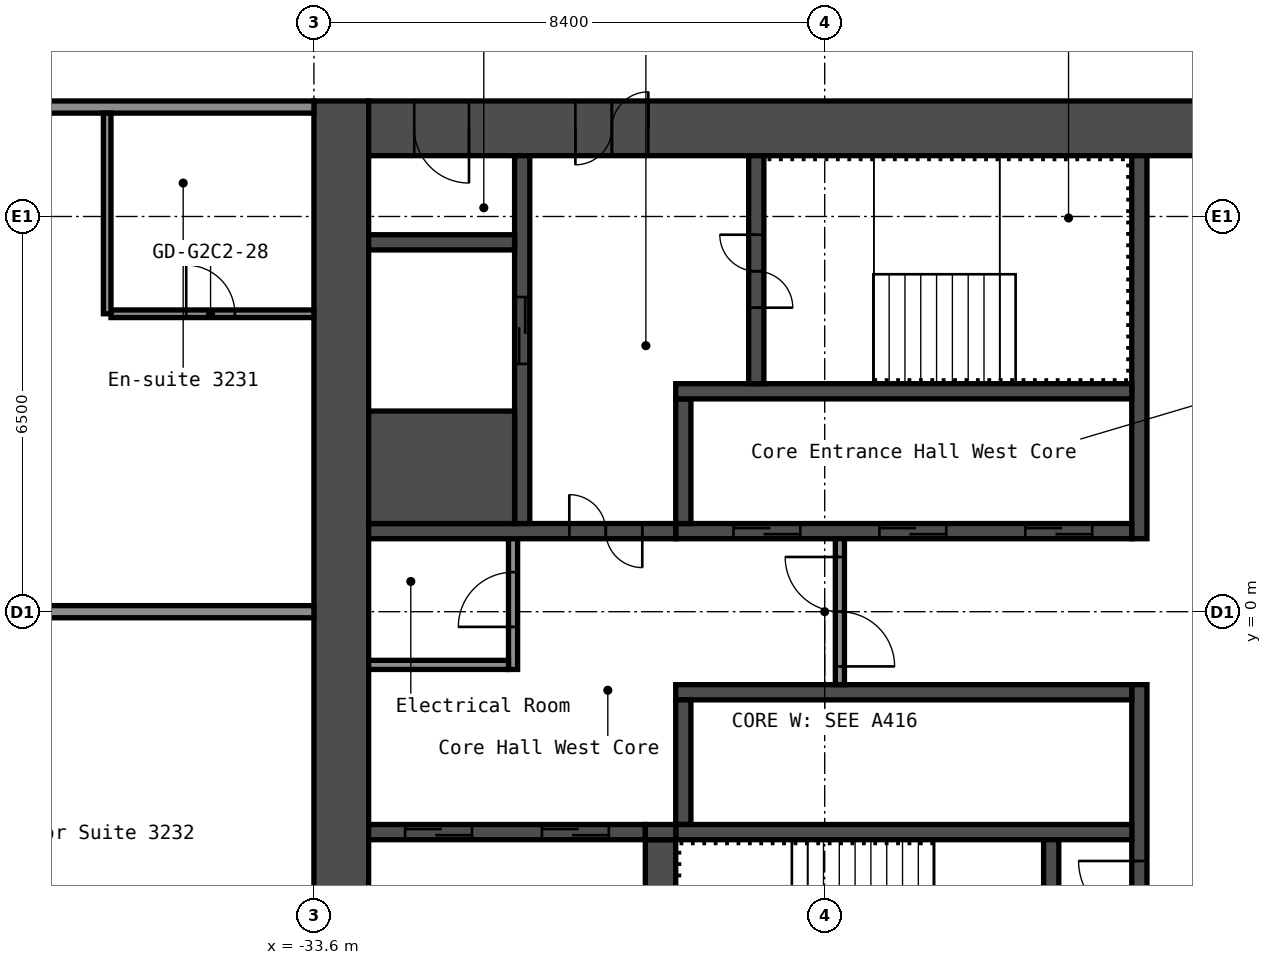
"""IFC4 building model, lengths in metres.
Left out: names, types, materials, properties, quantities, classifications, styles, units other than length and angle.
Written with IfcOpenShell. Run it as: python <this file> out.ifc"""

import sys

from ifc_helpers import new_model, si_unit, direction, frame, frame_2d, origin, place, context, subcontext, project, spatial, rectangle, extrude, element, fill, save


model = new_model("IFC4")
c1 = context("Model", 3, precision=1e-05, world=origin(), true_north=direction((0.0, 1.0)))
c2 = subcontext(c1, "Body", "Model", "MODEL_VIEW")
j1 = project(units=[si_unit("LENGTHUNIT", "METRE"), si_unit("PLANEANGLEUNIT", "RADIAN")], contexts=[c1])
p1 = place(None, origin())
s1 = spatial("IfcSite", under=j1, at=p1, CompositionType="ELEMENT")
p2 = place(p1, origin())
s2 = spatial("IfcBuilding", under=s1, at=p2, CompositionType="ELEMENT")
p3 = place(p2, frame((0.0, 0.0, 113.8)))
s3 = spatial("IfcBuildingStorey", under=s2, at=p3, CompositionType="ELEMENT", Elevation=113.8)
p4 = place(p3, frame((-33.15, -8.4, 0.0), z_axis=(0.0, 0.0, 1.0), x_axis=(0.0, 1.0, 0.0)))
e1 = element("IfcWall", 1, at=p4, inside=s3, PredefinedType="SHEAR", context=c2, shape_type="SweptSolid", body=[
    extrude(rectangle(XDim=16.8, YDim=0.9, at=frame_2d((8.4, 0.0))), origin(), (0.0, 0.0, 1.0), 2.8),
])
p5 = place(p3, frame((-32.7, 7.95, 0.0), z_axis=(0.0, 0.0, 1.0), x_axis=(1.0, 0.0, 0.0)))
e2 = element("IfcWall", 2, at=p5, inside=s3, PredefinedType="SHEAR", context=c2, shape_type="SweptSolid", body=[
    extrude(rectangle(XDim=15.0, YDim=0.9, at=frame_2d((7.5, 0.0))), origin(), (0.0, 0.0, 1.0), 2.8),
])
p6 = place(p5, frame((3.4, 0.0, 0.0)))
e3 = element("IfcOpeningElement", 3, at=p6, cuts=e2, PredefinedType="OPENING", context=c2, shape_type="SweptSolid", body=[
    extrude(rectangle(XDim=1.2, YDim=2.1, at=frame_2d((0.6, 1.05))), frame((0.0, 0.46, 0.0), z_axis=(0.0, -1.0, 0.0), x_axis=(1.0, 0.0, 0.0)), (0.0, 0.0, 1.0), 0.92),
])
p7 = place(p5, frame((0.75, 0.0, 0.0)))
e4 = element("IfcOpeningElement", 4, at=p7, cuts=e2, PredefinedType="OPENING", context=c2, shape_type="SweptSolid", body=[
    extrude(rectangle(XDim=0.9, YDim=2.1, at=frame_2d((0.45, 1.05))), frame((0.0, 0.46, 0.0), z_axis=(0.0, -1.0, 0.0), x_axis=(1.0, 0.0, 0.0)), (0.0, 0.0, 1.0), 0.92),
])
p8 = place(p3, frame((-20.025, 1.2, 0.0), z_axis=(0.0, 0.0, 1.0), x_axis=(0.0, 1.0, 0.0)))
e5 = element("IfcWall", 5, at=p8, inside=s3, PredefinedType="SHEAR", context=c2, shape_type="SweptSolid", body=[
    extrude(rectangle(XDim=6.3, YDim=0.25, at=frame_2d((3.15, 0.0))), origin(), (0.0, 0.0, 1.0), 2.8),
])
p9 = place(p3, frame((-20.025, -7.5, 0.0), z_axis=(0.0, 0.0, 1.0), x_axis=(0.0, 1.0, 0.0)))
e6 = element("IfcWall", 6, at=p9, inside=s3, PredefinedType="SHEAR", context=c2, shape_type="SweptSolid", body=[
    extrude(rectangle(XDim=6.3, YDim=0.25, at=frame_2d((3.15, 0.0))), origin(), (0.0, 0.0, 1.0), 2.8),
])
p10 = place(p9, frame((2.4, 0.0, 0.0)))
e7 = element("IfcOpeningElement", 7, at=p10, cuts=e6, PredefinedType="OPENING", context=c2, shape_type="SweptSolid", body=[
    extrude(rectangle(XDim=1.0, YDim=2.1, at=frame_2d((0.5, 1.05))), frame((0.0, 0.135, 0.0), z_axis=(0.0, -1.0, 0.0), x_axis=(1.0, 0.0, 0.0)), (0.0, 0.0, 1.0), 0.27),
])
p11 = place(p3, frame((-27.65, 1.325, 0.0), z_axis=(0.0, 0.0, 1.0), x_axis=(1.0, 0.0, 0.0)))
e8 = element("IfcWall", 8, at=p11, inside=s3, PredefinedType="SHEAR", context=c2, shape_type="SweptSolid", body=[
    extrude(rectangle(XDim=7.5, YDim=0.25, at=frame_2d((3.75, 0.0))), origin(), (0.0, 0.0, 1.0), 2.8),
])
p12 = place(p11, frame((5.75, 0.0, 0.0)))
e9 = element("IfcOpeningElement", 9, at=p12, cuts=e8, PredefinedType="OPENING", context=c2, shape_type="SweptSolid", body=[
    extrude(rectangle(XDim=1.1, YDim=2.1, at=frame_2d((0.55, 1.05))), frame((0.0, 0.135, 0.0), z_axis=(0.0, -1.0, 0.0), x_axis=(1.0, 0.0, 0.0)), (0.0, 0.0, 1.0), 0.27),
])
p13 = place(p11, frame((3.35, 0.0, 0.0)))
e10 = element("IfcOpeningElement", 10, at=p13, cuts=e8, PredefinedType="OPENING", context=c2, shape_type="SweptSolid", body=[
    extrude(rectangle(XDim=1.1, YDim=2.1, at=frame_2d((0.55, 1.05))), frame((0.0, 0.135, 0.0), z_axis=(0.0, -1.0, 0.0), x_axis=(1.0, 0.0, 0.0)), (0.0, 0.0, 1.0), 0.27),
])
p14 = place(p11, frame((0.95, 0.0, 0.0)))
e11 = element("IfcOpeningElement", 11, at=p14, cuts=e8, PredefinedType="OPENING", context=c2, shape_type="SweptSolid", body=[
    extrude(rectangle(XDim=1.1, YDim=2.1, at=frame_2d((0.55, 1.05))), frame((0.0, 0.135, 0.0), z_axis=(0.0, -1.0, 0.0), x_axis=(1.0, 0.0, 0.0)), (0.0, 0.0, 1.0), 0.27),
])
p15 = place(p3, frame((-27.525, 1.45, 0.0), z_axis=(0.0, 0.0, 1.0), x_axis=(0.0, 1.0, 0.0)))
e12 = element("IfcWall", 12, at=p15, inside=s3, PredefinedType="SHEAR", context=c2, shape_type="SweptSolid", body=[
    extrude(rectangle(XDim=2.05, YDim=0.25, at=frame_2d((1.025, 0.0))), origin(), (0.0, 0.0, 1.0), 2.8),
])
p16 = place(p3, frame((-27.65, 3.625, 0.0), z_axis=(0.0, 0.0, 1.0), x_axis=(1.0, 0.0, 0.0)))
e13 = element("IfcWall", 13, at=p16, inside=s3, PredefinedType="SHEAR", context=c2, shape_type="SweptSolid", body=[
    extrude(rectangle(XDim=7.5, YDim=0.25, at=frame_2d((3.75, 0.0))), origin(), (0.0, 0.0, 1.0), 2.8),
])
p17 = place(p3, frame((-26.325, 3.75, 0.0), z_axis=(0.0, 0.0, 1.0), x_axis=(0.0, 1.0, 0.0)))
e14 = element("IfcWall", 14, at=p17, inside=s3, PredefinedType="SHEAR", context=c2, shape_type="SweptSolid", body=[
    extrude(rectangle(XDim=3.75, YDim=0.25, at=frame_2d((1.875, 0.0))), origin(), (0.0, 0.0, 1.0), 2.8),
])
p18 = place(p17, frame((1.25, 0.0, 0.0)))
e15 = element("IfcOpeningElement", 15, at=p18, cuts=e14, PredefinedType="OPENING", context=c2, shape_type="SweptSolid", body=[
    extrude(rectangle(XDim=1.2, YDim=2.1, at=frame_2d((0.6, 1.05))), frame((0.0, 0.135, 0.0), z_axis=(0.0, -1.0, 0.0), x_axis=(1.0, 0.0, 0.0)), (0.0, 0.0, 1.0), 0.27),
])
p19 = place(p3, frame((-32.7, 1.325, 0.0), z_axis=(0.0, 0.0, 1.0), x_axis=(1.0, 0.0, 0.0)))
e16 = element("IfcWall", 16, at=p19, inside=s3, PredefinedType="SHEAR", context=c2, shape_type="SweptSolid", body=[
    extrude(rectangle(XDim=5.05, YDim=0.25, at=frame_2d((2.525, 0.0))), origin(), (0.0, 0.0, 1.0), 2.8),
])
p20 = place(p19, frame((3.3, 0.0, 0.0)))
e17 = element("IfcOpeningElement", 17, at=p20, cuts=e16, PredefinedType="OPENING", context=c2, shape_type="SweptSolid", body=[
    extrude(rectangle(XDim=1.2, YDim=2.1, at=frame_2d((0.6, 1.05))), frame((0.0, 0.135, 0.0), z_axis=(0.0, -1.0, 0.0), x_axis=(1.0, 0.0, 0.0)), (0.0, 0.0, 1.0), 0.27),
])
p21 = place(p3, frame((-30.175, 1.45, 0.0), z_axis=(0.0, 0.0, 1.0), x_axis=(0.0, 1.0, 0.0)))
e18 = element("IfcWall", 18, at=p21, inside=s3, PredefinedType="SHEAR", context=c2, shape_type="SweptSolid", body=[
    extrude(rectangle(XDim=6.05, YDim=0.25, at=frame_2d((3.025, 0.0))), origin(), (0.0, 0.0, 1.0), 2.8),
])
p22 = place(p21, frame((2.625, 0.0, 0.0)))
e19 = element("IfcOpeningElement", 19, at=p22, cuts=e18, PredefinedType="OPENING", context=c2, shape_type="SweptSolid", body=[
    extrude(rectangle(XDim=1.1, YDim=2.1, at=frame_2d((0.55, 1.05))), frame((0.0, 0.135, 0.0), z_axis=(0.0, -1.0, 0.0), x_axis=(1.0, 0.0, 0.0)), (0.0, 0.0, 1.0), 0.27),
])
p23 = place(p3, frame((-32.7, 2.375, 0.0), z_axis=(0.0, 0.0, 1.0), x_axis=(1.0, 0.0, 0.0)))
e20 = element("IfcWall", 20, at=p23, inside=s3, PredefinedType="SHEAR", context=c2, shape_type="SweptSolid", body=[
    extrude(rectangle(XDim=2.4, YDim=1.85, at=frame_2d((1.2, 0.0))), origin(), (0.0, 0.0, 1.0), 2.8),
])
p24 = place(p3, frame((-32.7, 6.075, 0.0), z_axis=(0.0, 0.0, 1.0), x_axis=(1.0, 0.0, 0.0)))
e21 = element("IfcWall", 21, at=p24, inside=s3, PredefinedType="SHEAR", context=c2, shape_type="SweptSolid", body=[
    extrude(rectangle(XDim=2.4, YDim=0.25, at=frame_2d((1.2, 0.0))), origin(), (0.0, 0.0, 1.0), 2.8),
])
p25 = place(p3, frame((-27.65, -1.325, 0.0), z_axis=(0.0, 0.0, 1.0), x_axis=(1.0, 0.0, 0.0)))
e22 = element("IfcWall", 22, at=p25, inside=s3, PredefinedType="SHEAR", context=c2, shape_type="SweptSolid", body=[
    extrude(rectangle(XDim=7.5, YDim=0.25, at=frame_2d((3.75, 0.0))), origin(), (0.0, 0.0, 1.0), 2.8),
])
p26 = place(p3, frame((-27.525, -3.5, 0.0), z_axis=(0.0, 0.0, 1.0), x_axis=(0.0, 1.0, 0.0)))
e23 = element("IfcWall", 23, at=p26, inside=s3, PredefinedType="SHEAR", context=c2, shape_type="SweptSolid", body=[
    extrude(rectangle(XDim=2.05, YDim=0.25, at=frame_2d((1.025, 0.0))), origin(), (0.0, 0.0, 1.0), 2.8),
])
p27 = place(p3, frame((-27.65, -3.625, 0.0), z_axis=(0.0, 0.0, 1.0), x_axis=(1.0, 0.0, 0.0)))
e24 = element("IfcWall", 24, at=p27, inside=s3, PredefinedType="SHEAR", context=c2, shape_type="SweptSolid", body=[
    extrude(rectangle(XDim=7.5, YDim=0.25, at=frame_2d((3.75, 0.0))), origin(), (0.0, 0.0, 1.0), 2.8),
])
p28 = place(p3, frame((-21.475, -7.5, 0.0), z_axis=(0.0, 0.0, 1.0), x_axis=(0.0, 1.0, 0.0)))
e25 = element("IfcWall", 25, at=p28, inside=s3, PredefinedType="SHEAR", context=c2, shape_type="SweptSolid", body=[
    extrude(rectangle(XDim=3.75, YDim=0.25, at=frame_2d((1.875, 0.0))), origin(), (0.0, 0.0, 1.0), 2.8),
])
p29 = place(p28, frame((1.3, 0.0, 0.0)))
e26 = element("IfcOpeningElement", 26, at=p29, cuts=e25, PredefinedType="OPENING", context=c2, shape_type="SweptSolid", body=[
    extrude(rectangle(XDim=1.2, YDim=2.1, at=frame_2d((0.6, 1.05))), frame((0.0, 0.135, 0.0), z_axis=(0.0, -1.0, 0.0), x_axis=(1.0, 0.0, 0.0)), (0.0, 0.0, 1.0), 0.27),
])
p30 = place(p3, frame((-27.9, -7.5, 0.0), z_axis=(0.0, 0.0, 1.0), x_axis=(0.0, 1.0, 0.0)))
e27 = element("IfcWall", 27, at=p30, inside=s3, PredefinedType="SHEAR", context=c2, shape_type="SweptSolid", body=[
    extrude(rectangle(XDim=3.75, YDim=0.5, at=frame_2d((1.875, 0.0))), origin(), (0.0, 0.0, 1.0), 2.8),
])
p31 = place(p3, frame((-32.7, -3.625, 0.0), z_axis=(0.0, 0.0, 1.0), x_axis=(1.0, 0.0, 0.0)))
e28 = element("IfcWall", 28, at=p31, inside=s3, PredefinedType="SHEAR", context=c2, shape_type="SweptSolid", body=[
    extrude(rectangle(XDim=4.55, YDim=0.25, at=frame_2d((2.275, 0.0))), origin(), (0.0, 0.0, 1.0), 2.8),
])
p32 = place(p31, frame((2.85, 0.0, 0.0)))
e29 = element("IfcOpeningElement", 29, at=p32, cuts=e28, PredefinedType="OPENING", context=c2, shape_type="SweptSolid", body=[
    extrude(rectangle(XDim=1.1, YDim=2.1, at=frame_2d((0.55, 1.05))), frame((0.0, 0.135, 0.0), z_axis=(0.0, -1.0, 0.0), x_axis=(1.0, 0.0, 0.0)), (0.0, 0.0, 1.0), 0.27),
])
p33 = place(p31, frame((0.6, 0.0, 0.0)))
e30 = element("IfcOpeningElement", 30, at=p33, cuts=e28, PredefinedType="OPENING", context=c2, shape_type="SweptSolid", body=[
    extrude(rectangle(XDim=1.1, YDim=2.1, at=frame_2d((0.55, 1.05))), frame((0.0, 0.135, 0.0), z_axis=(0.0, -1.0, 0.0), x_axis=(1.0, 0.0, 0.0)), (0.0, 0.0, 1.0), 0.27),
])
p34 = place(p3, frame((-28.15, -3.625, 0.0), z_axis=(0.0, 0.0, 1.0), x_axis=(1.0, 0.0, 0.0)))
e31 = element("IfcWall", 31, at=p34, inside=s3, PredefinedType="SHEAR", context=c2, shape_type="SweptSolid", body=[
    extrude(rectangle(XDim=0.5, YDim=0.25, at=frame_2d((0.25, 0.0))), origin(), (0.0, 0.0, 1.0), 2.8),
])
p35 = place(p3, frame((-24.95, -1.2, 0.0), z_axis=(0.0, 0.0, 1.0), x_axis=(0.0, 1.0, 0.0)))
e32 = element("IfcWall", 32, at=p35, inside=s3, PredefinedType="PARTITIONING", context=c2, shape_type="SweptSolid", body=[
    extrude(rectangle(XDim=2.4, YDim=0.15, at=frame_2d((1.2, 0.0))), origin(), (0.0, 0.0, 1.0), 2.8),
])
p36 = place(p35, frame((0.3, 0.0, 0.0)))
e33 = element("IfcOpeningElement", 33, at=p36, cuts=e32, PredefinedType="OPENING", context=c2, shape_type="SweptSolid", body=[
    extrude(rectangle(XDim=1.8, YDim=2.1, at=frame_2d((0.9, 1.05))), frame((0.0, 0.085, 0.0), z_axis=(0.0, -1.0, 0.0), x_axis=(1.0, 0.0, 0.0)), (0.0, 0.0, 1.0), 0.17),
])
p37 = place(p3, frame((-30.325, -0.95, 0.0), z_axis=(0.0, 0.0, 1.0), x_axis=(0.0, 1.0, 0.0)))
e34 = element("IfcWall", 34, at=p37, inside=s3, PredefinedType="PARTITIONING", context=c2, shape_type="SweptSolid", body=[
    extrude(rectangle(XDim=2.15, YDim=0.15, at=frame_2d((1.075, 0.0))), origin(), (0.0, 0.0, 1.0), 2.8),
])
p38 = place(p37, frame((0.7, 0.0, 0.0)))
e35 = element("IfcOpeningElement", 35, at=p38, cuts=e34, PredefinedType="OPENING", context=c2, shape_type="SweptSolid", body=[
    extrude(rectangle(XDim=0.9, YDim=2.1, at=frame_2d((0.45, 1.05))), frame((0.0, 0.085, 0.0), z_axis=(0.0, -1.0, 0.0), x_axis=(1.0, 0.0, 0.0)), (0.0, 0.0, 1.0), 0.17),
])
p39 = place(p3, frame((-32.7, -0.875, 0.0), z_axis=(0.0, 0.0, 1.0), x_axis=(1.0, 0.0, 0.0)))
e36 = element("IfcWall", 36, at=p39, inside=s3, PredefinedType="PARTITIONING", context=c2, shape_type="SweptSolid", body=[
    extrude(rectangle(XDim=2.3, YDim=0.15, at=frame_2d((1.15, 0.0))), origin(), (0.0, 0.0, 1.0), 2.8),
])
p40 = place(p3, frame((-43.9, 0.0, 0.0), z_axis=(0.0, 0.0, 1.0), x_axis=(1.0, 0.0, 0.0)))
e37 = element("IfcWall", 37, at=p40, inside=s3, PredefinedType="PARTITIONING", context=c2, shape_type="SweptSolid", body=[
    extrude(rectangle(XDim=10.3, YDim=0.2, at=frame_2d((5.15, 0.0))), origin(), (0.0, 0.0, 1.0), 2.8),
])
p41 = place(p3, frame((-36.938, 4.9, 0.0), z_axis=(0.0, 0.0, 1.0), x_axis=(1.0, 0.0, 0.0)))
e38 = element("IfcWall", 38, at=p41, inside=s3, PredefinedType="PARTITIONING", context=c2, shape_type="SweptSolid", body=[
    extrude(rectangle(XDim=3.337, YDim=0.125, at=frame_2d((1.669, 0.0))), origin(), (0.0, 0.0, 1.0), 2.8),
])
p42 = place(p41, frame((1.238, 0.0, 0.0)))
e39 = element("IfcOpeningElement", 39, at=p42, cuts=e38, PredefinedType="OPENING", context=c2, shape_type="SweptSolid", body=[
    extrude(rectangle(XDim=0.8, YDim=2.1, at=frame_2d((0.4, 1.05))), frame((0.0, 0.073, 0.0), z_axis=(0.0, -1.0, 0.0), x_axis=(1.0, 0.0, 0.0)), (0.0, 0.0, 1.0), 0.145),
])
p43 = place(p3, frame((-44.0, 8.3, 0.0), z_axis=(0.0, 0.0, 1.0), x_axis=(1.0, 0.0, 0.0)))
e40 = element("IfcWall", 40, at=p43, inside=s3, PredefinedType="PARTITIONING", context=c2, shape_type="SweptSolid", body=[
    extrude(rectangle(XDim=10.4, YDim=0.2, at=frame_2d((5.2, 0.0))), origin(), (0.0, 0.0, 1.0), 2.8),
])
p44 = place(p43, frame((3.05, 0.0, 0.0)))
e41 = element("IfcOpeningElement", 41, at=p44, cuts=e40, PredefinedType="OPENING", context=c2, shape_type="SweptSolid", body=[
    extrude(rectangle(XDim=1.0, YDim=2.1, at=frame_2d((0.5, 1.05))), frame((0.0, 0.11, 0.0), z_axis=(0.0, -1.0, 0.0), x_axis=(1.0, 0.0, 0.0)), (0.0, 0.0, 1.0), 0.22),
])
p45 = place(p3, frame((-37.0, 4.9, 0.0), z_axis=(0.0, 0.0, 1.0), x_axis=(0.0, 1.0, 0.0)))
e42 = element("IfcWall", 42, at=p45, inside=s3, PredefinedType="PARTITIONING", context=c2, shape_type="SweptSolid", body=[
    extrude(rectangle(XDim=3.3, YDim=0.125, at=frame_2d((1.65, 0.0))), origin(), (0.0, 0.0, 1.0), 2.8),
])
p46 = place(p6, origin())
e43 = element("IfcDoor", 43, at=p46, inside=s3, OperationType="DOUBLE_DOOR_SINGLE_SWING", PredefinedType="DOOR", context=c2, shape_type="SweptSolid", body=[
    extrude(rectangle(XDim=1.2, YDim=2.1, at=frame_2d((0.6, 1.05))), frame((0.0, 0.025, 0.0), z_axis=(0.0, -1.0, 0.0), x_axis=(1.0, 0.0, 0.0)), (0.0, 0.0, 1.0), 0.05),
])
fill(e3, e43)
p47 = place(p7, origin())
e44 = element("IfcDoor", 44, at=p47, inside=s3, OperationType="SINGLE_SWING_RIGHT", PredefinedType="DOOR", context=c2, shape_type="SweptSolid", body=[
    extrude(rectangle(XDim=0.9, YDim=2.1, at=frame_2d((0.45, 1.05))), frame((0.0, 0.025, 0.0), z_axis=(0.0, -1.0, 0.0), x_axis=(1.0, 0.0, 0.0)), (0.0, 0.0, 1.0), 0.05),
])
fill(e4, e44)
p48 = place(p18, origin())
e45 = element("IfcDoor", 45, at=p48, inside=s3, OperationType="DOUBLE_DOOR_SINGLE_SWING", PredefinedType="DOOR", context=c2, shape_type="SweptSolid", body=[
    extrude(rectangle(XDim=1.2, YDim=2.1, at=frame_2d((0.6, 1.05))), frame((0.0, 0.025, 0.0), z_axis=(0.0, -1.0, 0.0), x_axis=(1.0, 0.0, 0.0)), (0.0, 0.0, 1.0), 0.05),
])
fill(e15, e45)
p49 = place(p10, origin())
e46 = element("IfcDoor", 46, at=p49, inside=s3, OperationType="SINGLE_SWING_LEFT", PredefinedType="DOOR", context=c2, shape_type="SweptSolid", body=[
    extrude(rectangle(XDim=1.0, YDim=2.1, at=frame_2d((0.5, 1.05))), frame((0.0, 0.025, 0.0), z_axis=(0.0, -1.0, 0.0), x_axis=(1.0, 0.0, 0.0)), (0.0, 0.0, 1.0), 0.05),
])
fill(e7, e46)
p50 = place(p20, origin())
e47 = element("IfcDoor", 47, at=p50, inside=s3, OperationType="DOUBLE_DOOR_SINGLE_SWING", PredefinedType="DOOR", context=c2, shape_type="SweptSolid", body=[
    extrude(rectangle(XDim=1.2, YDim=2.1, at=frame_2d((0.6, 1.05))), frame((0.0, 0.025, 0.0), z_axis=(0.0, -1.0, 0.0), x_axis=(1.0, 0.0, 0.0)), (0.0, 0.0, 1.0), 0.05),
])
fill(e17, e47)
p51 = place(p36, origin())
e48 = element("IfcDoor", 48, at=p51, inside=s3, OperationType="DOUBLE_DOOR_SINGLE_SWING", PredefinedType="DOOR", context=c2, shape_type="SweptSolid", body=[
    extrude(rectangle(XDim=1.8, YDim=2.1, at=frame_2d((0.9, 1.05))), frame((0.0, 0.025, 0.0), z_axis=(0.0, -1.0, 0.0), x_axis=(1.0, 0.0, 0.0)), (0.0, 0.0, 1.0), 0.05),
])
fill(e33, e48)
p52 = place(p38, origin())
e49 = element("IfcDoor", 49, at=p52, inside=s3, OperationType="SINGLE_SWING_RIGHT", PredefinedType="DOOR", context=c2, shape_type="SweptSolid", body=[
    extrude(rectangle(XDim=0.9, YDim=2.1, at=frame_2d((0.45, 1.05))), frame((0.0, 0.025, 0.0), z_axis=(0.0, -1.0, 0.0), x_axis=(1.0, 0.0, 0.0)), (0.0, 0.0, 1.0), 0.05),
])
fill(e35, e49)
p53 = place(p12, origin())
e50 = element("IfcDoor", 50, at=p53, inside=s3, OperationType="DOUBLE_DOOR_SLIDING", PredefinedType="DOOR", context=c2, shape_type="SweptSolid", body=[
    extrude(rectangle(XDim=1.1, YDim=2.1, at=frame_2d((0.55, 1.05))), frame((0.0, 0.025, 0.0), z_axis=(0.0, -1.0, 0.0), x_axis=(1.0, 0.0, 0.0)), (0.0, 0.0, 1.0), 0.05),
])
fill(e9, e50)
p54 = place(p13, origin())
e51 = element("IfcDoor", 51, at=p54, inside=s3, OperationType="DOUBLE_DOOR_SLIDING", PredefinedType="DOOR", context=c2, shape_type="SweptSolid", body=[
    extrude(rectangle(XDim=1.1, YDim=2.1, at=frame_2d((0.55, 1.05))), frame((0.0, 0.025, 0.0), z_axis=(0.0, -1.0, 0.0), x_axis=(1.0, 0.0, 0.0)), (0.0, 0.0, 1.0), 0.05),
])
fill(e10, e51)
p55 = place(p14, origin())
e52 = element("IfcDoor", 52, at=p55, inside=s3, OperationType="DOUBLE_DOOR_SLIDING", PredefinedType="DOOR", context=c2, shape_type="SweptSolid", body=[
    extrude(rectangle(XDim=1.1, YDim=2.1, at=frame_2d((0.55, 1.05))), frame((0.0, 0.025, 0.0), z_axis=(0.0, -1.0, 0.0), x_axis=(1.0, 0.0, 0.0)), (0.0, 0.0, 1.0), 0.05),
])
fill(e11, e52)
p56 = place(p22, origin())
e53 = element("IfcDoor", 53, at=p56, inside=s3, OperationType="DOUBLE_DOOR_SLIDING", PredefinedType="DOOR", context=c2, shape_type="SweptSolid", body=[
    extrude(rectangle(XDim=1.1, YDim=2.1, at=frame_2d((0.55, 1.05))), frame((0.0, 0.025, 0.0), z_axis=(0.0, -1.0, 0.0), x_axis=(1.0, 0.0, 0.0)), (0.0, 0.0, 1.0), 0.05),
])
fill(e19, e53)
p57 = place(p32, origin())
e54 = element("IfcDoor", 54, at=p57, inside=s3, OperationType="DOUBLE_DOOR_SLIDING", PredefinedType="DOOR", context=c2, shape_type="SweptSolid", body=[
    extrude(rectangle(XDim=1.1, YDim=2.1, at=frame_2d((0.55, 1.05))), frame((0.0, 0.025, 0.0), z_axis=(0.0, -1.0, 0.0), x_axis=(1.0, 0.0, 0.0)), (0.0, 0.0, 1.0), 0.05),
])
fill(e29, e54)
p58 = place(p33, origin())
e55 = element("IfcDoor", 55, at=p58, inside=s3, OperationType="DOUBLE_DOOR_SLIDING", PredefinedType="DOOR", context=c2, shape_type="SweptSolid", body=[
    extrude(rectangle(XDim=1.1, YDim=2.1, at=frame_2d((0.55, 1.05))), frame((0.0, 0.025, 0.0), z_axis=(0.0, -1.0, 0.0), x_axis=(1.0, 0.0, 0.0)), (0.0, 0.0, 1.0), 0.05),
])
fill(e30, e55)
p59 = place(p42, origin())
e56 = element("IfcDoor", 56, at=p59, inside=s3, OperationType="SINGLE_SWING_RIGHT", PredefinedType="DOOR", context=c2, shape_type="SweptSolid", body=[
    extrude(rectangle(XDim=0.8, YDim=2.1, at=frame_2d((0.4, 1.05))), frame((0.0, 0.025, 0.0), z_axis=(0.0, -1.0, 0.0), x_axis=(1.0, 0.0, 0.0)), (0.0, 0.0, 1.0), 0.05),
])
fill(e39, e56)
save(model, sys.argv[1])
